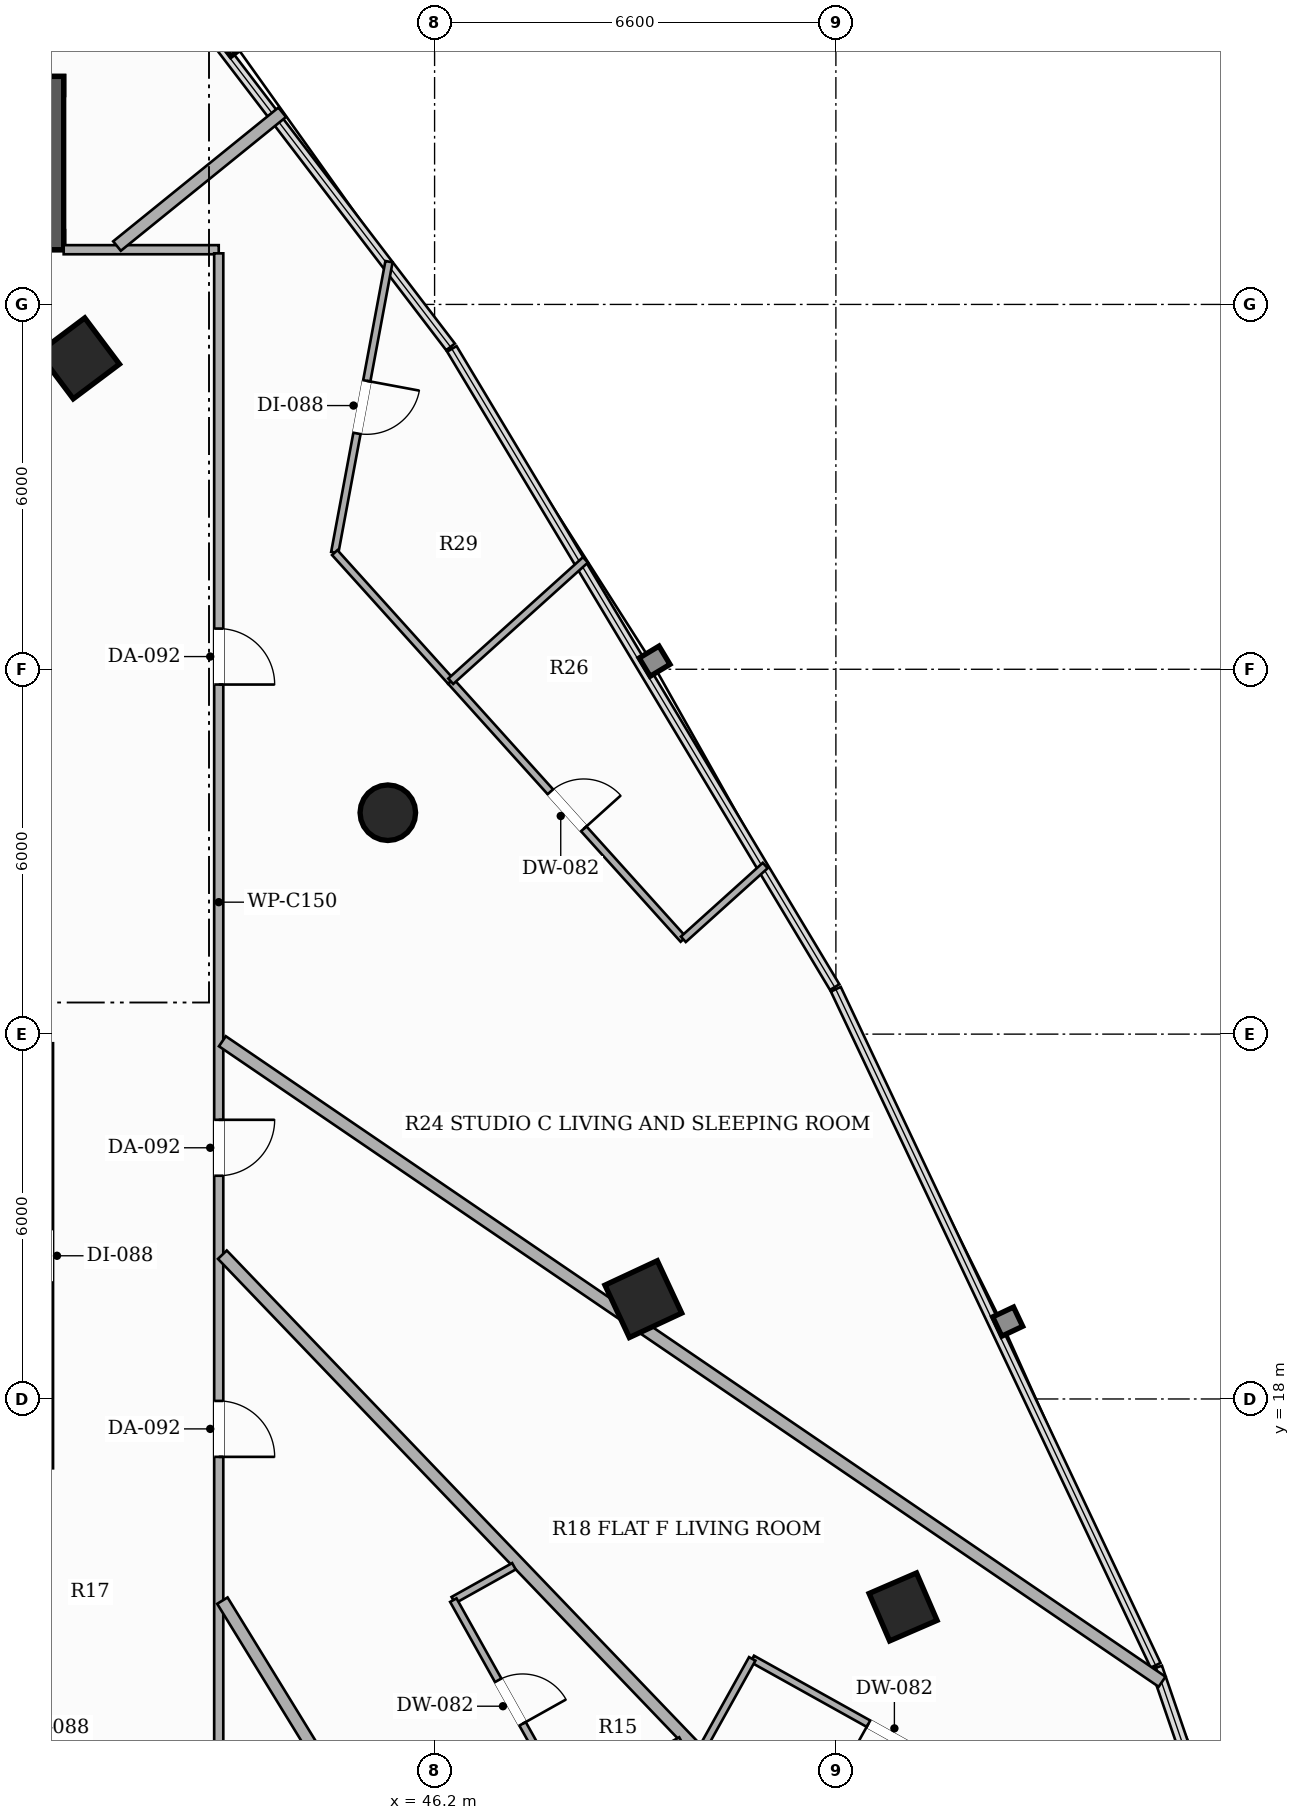
"""IFC4 building model, lengths in metres.
Left out: names, types, materials, properties, quantities, classifications, styles, units other than length and angle.
Written with IfcOpenShell. Run it as: python <this file> out.ifc"""

import sys

from ifc_helpers import new_model, si_unit, direction, frame, frame_2d, origin, origin_2d, place, context, subcontext, project, spatial, rectangle, hollow_rectangle, hollow_circle, extrude, element, fill, save


model = new_model("IFC4")
c1 = context("Model", 3, precision=1e-05, world=origin(), true_north=direction((0.0, 1.0)))
c2 = subcontext(c1, "Body", "Model", "MODEL_VIEW")
j1 = project(units=[si_unit("LENGTHUNIT", "METRE"), si_unit("PLANEANGLEUNIT", "RADIAN")], contexts=[c1])
p1 = place(None, origin())
s1 = spatial("IfcSite", under=j1, at=p1, CompositionType="ELEMENT")
p2 = place(p1, origin())
s2 = spatial("IfcBuilding", under=s1, at=p2, CompositionType="ELEMENT")
p3 = place(p2, frame((0.0, 0.0, 77.45)))
s3 = spatial("IfcBuildingStorey", under=s2, at=p3, CompositionType="ELEMENT", Elevation=77.45)
p4 = place(p3, frame((40.1, 37.05, 0.0), z_axis=(0.0, 0.0, 1.0), x_axis=(-1.0, 0.0, 0.0)))
e1 = element("IfcWall", 1, at=p4, inside=s3, PredefinedType="SHEAR", context=c2, shape_type="SweptSolid", body=[
    extrude(rectangle(XDim=14.2, YDim=0.3, at=frame_2d((7.1, 0.0))), origin(), (0.0, 0.0, 1.0), 3.3),
])
p5 = place(p4, frame((12.325, 0.0, 0.0)))
e2 = element("IfcOpeningElement", 2, at=p5, cuts=e1, PredefinedType="OPENING", context=c2, shape_type="SweptSolid", body=[
    extrude(rectangle(XDim=1.1, YDim=2.2, at=frame_2d((0.55, 1.1))), frame((0.0, 0.16, 0.0), z_axis=(0.0, -1.0, 0.0), x_axis=(1.0, 0.0, 0.0)), (0.0, 0.0, 1.0), 0.32),
])
p6 = place(p4, frame((0.775, 0.0, 0.0)))
e3 = element("IfcOpeningElement", 3, at=p6, cuts=e1, PredefinedType="OPENING", context=c2, shape_type="SweptSolid", body=[
    extrude(rectangle(XDim=1.1, YDim=2.2, at=frame_2d((0.55, 1.1))), frame((0.0, 0.16, 0.0), z_axis=(0.0, -1.0, 0.0), x_axis=(1.0, 0.0, 0.0)), (0.0, 0.0, 1.0), 0.32),
])
p7 = place(p3, frame((25.9, 39.6, 0.0), z_axis=(0.0, 0.0, 1.0), x_axis=(1.0, 0.0, 0.0)))
e4 = element("IfcWall", 4, at=p7, inside=s3, PredefinedType="SHEAR", context=c2, shape_type="SweptSolid", body=[
    extrude(rectangle(XDim=14.2, YDim=0.3, at=frame_2d((7.1, 0.0))), origin(), (0.0, 0.0, 1.0), 3.3),
])
p8 = place(p3, frame((39.95, 36.9, 0.0), z_axis=(0.0, 0.0, 1.0), x_axis=(0.0, 1.0, 0.0)))
e5 = element("IfcWall", 5, at=p8, inside=s3, PredefinedType="SHEAR", context=c2, shape_type="SweptSolid", body=[
    extrude(rectangle(XDim=2.85, YDim=0.3, at=frame_2d((1.425, 0.0))), origin(), (0.0, 0.0, 1.0), 3.3),
])
p9 = place(p3, frame((49.633, 19.642, 0.0), z_axis=(0.0, 0.0, 1.0), x_axis=(-0.422618261741, 0.906307787037, 0.0)))
e6 = element("IfcColumn", 6, at=p9, inside=s3, PredefinedType="COLUMN", context=c2, shape_type="SweptSolid", body=[
    extrude(hollow_rectangle(XDim=0.95, YDim=0.95, WallThickness=0.032, at=origin_2d()), origin(), (0.0, 0.0, 1.0), 3.3),
])
p10 = place(p3, frame((45.431, 27.641, 0.0), z_axis=(0.0, 0.0, 1.0), x_axis=(1.0, 0.0, 0.0)))
e7 = element("IfcColumn", 7, at=p10, inside=s3, PredefinedType="COLUMN", context=c2, shape_type="SweptSolid", body=[
    extrude(hollow_circle(Radius=0.457, WallThickness=0.025, at=origin_2d()), origin(), (0.0, 0.0, 1.0), 3.3),
])
p11 = place(p3, frame((40.352, 35.113, 0.0), z_axis=(0.0, 0.0, 1.0), x_axis=(-0.600420225326, 0.799684658487, 0.0)))
e8 = element("IfcColumn", 8, at=p11, inside=s3, PredefinedType="COLUMN", context=c2, shape_type="SweptSolid", body=[
    extrude(hollow_rectangle(XDim=0.95, YDim=0.95, WallThickness=0.032, at=origin_2d()), origin(), (0.0, 0.0, 1.0), 3.3),
])
p12 = place(p3, frame((53.905, 14.58, 0.0), z_axis=(0.0, 0.0, 1.0), x_axis=(-0.397147890635, 0.917754625684, 0.0)))
e9 = element("IfcColumn", 9, at=p12, inside=s3, PredefinedType="COLUMN", context=c2, shape_type="SweptSolid", body=[
    extrude(hollow_rectangle(XDim=0.85, YDim=0.85, WallThickness=0.028, at=origin_2d()), origin(), (0.0, 0.0, 1.0), 3.3),
])
p13 = place(p3, frame((40.1, 36.9, 0.0), z_axis=(0.0, 0.0, 1.0), x_axis=(1.0, 0.0, 0.0)))
e10 = element("IfcWall", 10, at=p13, inside=s3, PredefinedType="PARTITIONING", context=c2, shape_type="SweptSolid", body=[
    extrude(rectangle(XDim=2.55, YDim=0.15, at=frame_2d((1.275, 0.0))), origin(), (0.0, 0.0, 1.0), 2.413),
])
p14 = place(p3, frame((42.65, 36.84, 0.0), z_axis=(0.0, 0.0, 1.0), x_axis=(0.0, -1.0, 0.0)))
e11 = element("IfcWall", 11, at=p14, inside=s3, PredefinedType="PARTITIONING", context=c2, shape_type="SweptSolid", body=[
    extrude(rectangle(XDim=25.04, YDim=0.15, at=frame_2d((12.52, 0.0))), origin(), (0.0, 0.0, 1.0), 2.413),
])
p15 = place(p14, frame((6.171, 0.0, 0.0)))
e12 = element("IfcOpeningElement", 12, at=p15, cuts=e11, PredefinedType="OPENING", context=c2, shape_type="SweptSolid", body=[
    extrude(rectangle(XDim=0.92, YDim=2.15, at=frame_2d((0.46, 1.075))), frame((0.0, 0.085, 0.0), z_axis=(0.0, -1.0, 0.0), x_axis=(1.0, 0.0, 0.0)), (0.0, 0.0, 1.0), 0.17),
])
p16 = place(p14, frame((14.249, 0.0, 0.0)))
e13 = element("IfcOpeningElement", 13, at=p16, cuts=e11, PredefinedType="OPENING", context=c2, shape_type="SweptSolid", body=[
    extrude(rectangle(XDim=0.92, YDim=2.15, at=frame_2d((0.46, 1.075))), frame((0.0, 0.085, 0.0), z_axis=(0.0, -1.0, 0.0), x_axis=(1.0, 0.0, 0.0)), (0.0, 0.0, 1.0), 0.17),
])
p17 = place(p14, frame((18.872, 0.0, 0.0)))
e14 = element("IfcOpeningElement", 14, at=p17, cuts=e11, PredefinedType="OPENING", context=c2, shape_type="SweptSolid", body=[
    extrude(rectangle(XDim=0.92, YDim=2.15, at=frame_2d((0.46, 1.075))), frame((0.0, 0.085, 0.0), z_axis=(0.0, -1.0, 0.0), x_axis=(1.0, 0.0, 0.0)), (0.0, 0.0, 1.0), 0.17),
])
p18 = place(p3, frame((39.85, 16.86, 0.0), z_axis=(0.0, 0.0, 1.0), x_axis=(0.0, 1.0, 0.0)))
e15 = element("IfcWall", 15, at=p18, inside=s3, PredefinedType="PARTITIONING", context=c2, shape_type="SweptSolid", body=[
    extrude(rectangle(XDim=6.99, YDim=0.15, at=frame_2d((3.495, 0.0))), origin(), (0.0, 0.0, 1.0), 2.669),
])
p19 = place(p18, frame((3.055, 0.0, 0.0)))
e16 = element("IfcOpeningElement", 16, at=p19, cuts=e15, PredefinedType="OPENING", context=c2, shape_type="SweptSolid", body=[
    extrude(rectangle(XDim=0.88, YDim=2.1, at=frame_2d((0.44, 1.05))), frame((0.0, 0.085, 0.0), z_axis=(0.0, -1.0, 0.0), x_axis=(1.0, 0.0, 0.0)), (0.0, 0.0, 1.0), 0.17),
])
p20 = place(p3, frame((43.694, 39.16, 0.0), z_axis=(0.0, 0.0, 1.0), x_axis=(-0.777183068613, -0.629274564765, 0.0)))
e17 = element("IfcWall", 17, at=p20, inside=s3, PredefinedType="PARTITIONING", context=c2, shape_type="SweptSolid", body=[
    extrude(rectangle(XDim=3.496, YDim=0.2, at=frame_2d((1.748, 0.0))), origin(), (0.0, 0.0, 1.0), 3.06),
])
p21 = place(p3, frame((58.165, 13.35, 0.0), z_axis=(0.0, 0.0, 1.0), x_axis=(-0.826341659386, 0.563169123766, 0.0)))
e18 = element("IfcWall", 18, at=p21, inside=s3, PredefinedType="PARTITIONING", context=c2, shape_type="SweptSolid", body=[
    extrude(rectangle(XDim=18.703, YDim=0.2, at=frame_2d((9.352, 0.0))), origin(), (0.0, 0.0, 1.0), 2.413),
])
p22 = place(p3, frame((58.237, 4.179, 0.0), z_axis=(0.0, 0.0, 1.0), x_axis=(-0.69208567792, 0.721815360337, 0.0)))
e19 = element("IfcWall", 19, at=p22, inside=s3, PredefinedType="PARTITIONING", context=c2, shape_type="SweptSolid", body=[
    extrude(rectangle(XDim=22.435, YDim=0.2, at=frame_2d((11.218, 0.0))), origin(), (0.0, 0.0, 1.0), 2.413),
])
p23 = place(p3, frame((49.827, 3.09, 0.0), z_axis=(0.0, 0.0, 1.0), x_axis=(-0.523146880199, 0.852242536921, 0.0)))
e20 = element("IfcWall", 20, at=p23, inside=s3, PredefinedType="PARTITIONING", context=c2, shape_type="SweptSolid", body=[
    extrude(rectangle(XDim=13.604, YDim=0.2, at=frame_2d((6.802, 0.0))), origin(), (0.0, 0.0, 1.0), 2.413),
])
p24 = place(p3, frame((46.466, 29.803, 0.0), z_axis=(0.0, 0.0, 1.0), x_axis=(0.669491047861, -0.742820124144, 0.0)))
e21 = element("IfcWall", 21, at=p24, inside=s3, PredefinedType="PARTITIONING", context=c2, shape_type="SweptSolid", body=[
    extrude(rectangle(XDim=5.713, YDim=0.12, at=frame_2d((2.856, 0.0))), origin(), (0.0, 0.0, 1.0), 3.06),
])
p25 = place(p24, frame((2.447, 0.0, 0.0)))
e22 = element("IfcOpeningElement", 22, at=p25, cuts=e21, PredefinedType="OPENING", context=c2, shape_type="SweptSolid", body=[
    extrude(rectangle(XDim=0.82, YDim=2.1, at=frame_2d((0.41, 1.05))), frame((0.0, 0.07, 0.0), z_axis=(0.0, -1.0, 0.0), x_axis=(1.0, 0.0, 0.0)), (0.0, 0.0, 1.0), 0.14),
])
p26 = place(p3, frame((50.291, 25.559, 0.0), z_axis=(0.0, 0.0, 1.0), x_axis=(0.742845405041, 0.669462996894, 0.0)))
e23 = element("IfcWall", 23, at=p26, inside=s3, PredefinedType="PARTITIONING", context=c2, shape_type="SweptSolid", body=[
    extrude(rectangle(XDim=1.813, YDim=0.12, at=frame_2d((0.907, 0.0))), origin(), (0.0, 0.0, 1.0), 3.06),
])
p27 = place(p3, frame((45.45, 36.703, 0.0), z_axis=(0.0, 0.0, 1.0), x_axis=(-0.183267636936, -0.9830630566, 0.0)))
e24 = element("IfcWall", 24, at=p27, inside=s3, PredefinedType="PARTITIONING", context=c2, shape_type="SweptSolid", body=[
    extrude(rectangle(XDim=4.866, YDim=0.12, at=frame_2d((2.433, 0.0))), origin(), (0.0, 0.0, 1.0), 3.06),
])
p28 = place(p27, frame((1.993, 0.0, 0.0)))
e25 = element("IfcOpeningElement", 25, at=p28, cuts=e24, PredefinedType="OPENING", context=c2, shape_type="SweptSolid", body=[
    extrude(rectangle(XDim=0.88, YDim=2.1, at=frame_2d((0.44, 1.05))), frame((0.0, 0.07, 0.0), z_axis=(0.0, -1.0, 0.0), x_axis=(1.0, 0.0, 0.0)), (0.0, 0.0, 1.0), 0.14),
])
p29 = place(p3, frame((44.558, 31.919, 0.0), z_axis=(0.0, 0.0, 1.0), x_axis=(0.669660366513, -0.742667485165, 0.0)))
e26 = element("IfcWall", 26, at=p29, inside=s3, PredefinedType="PARTITIONING", context=c2, shape_type="SweptSolid", body=[
    extrude(rectangle(XDim=2.849, YDim=0.12, at=frame_2d((1.425, 0.0))), origin(), (0.0, 0.0, 1.0), 3.06),
])
p30 = place(p3, frame((46.466, 29.803, 0.0), z_axis=(0.0, 0.0, 1.0), x_axis=(0.742837964983, 0.669471252392, 0.0)))
e27 = element("IfcWall", 27, at=p30, inside=s3, PredefinedType="PARTITIONING", context=c2, shape_type="SweptSolid", body=[
    extrude(rectangle(XDim=2.982, YDim=0.12, at=frame_2d((1.491, 0.0))), origin(), (0.0, 0.0, 1.0), 3.06),
])
p31 = place(p3, frame((54.847, 11.818, 0.0), z_axis=(0.0, 0.0, 1.0), x_axis=(-0.87346578699, 0.486885529624, 0.0)))
e28 = element("IfcWall", 28, at=p31, inside=s3, PredefinedType="PARTITIONING", context=c2, shape_type="SweptSolid", body=[
    extrude(rectangle(XDim=3.919, YDim=0.12, at=frame_2d((1.959, 0.0))), origin(), (0.0, 0.0, 1.0), 2.413),
])
p32 = place(p31, frame((0.91, 0.0, 0.0)))
e29 = element("IfcOpeningElement", 29, at=p32, cuts=e28, PredefinedType="OPENING", context=c2, shape_type="SweptSolid", body=[
    extrude(rectangle(XDim=0.82, YDim=2.1, at=frame_2d((0.41, 1.05))), frame((0.0, 0.07, 0.0), z_axis=(0.0, -1.0, 0.0), x_axis=(1.0, 0.0, 0.0)), (0.0, 0.0, 1.0), 0.14),
])
p33 = place(p3, frame((51.424, 13.726, 0.0), z_axis=(0.0, 0.0, 1.0), x_axis=(-0.486605473044, -0.873621836726, 0.0)))
e30 = element("IfcWall", 30, at=p33, inside=s3, PredefinedType="PARTITIONING", context=c2, shape_type="SweptSolid", body=[
    extrude(rectangle(XDim=1.679, YDim=0.12, at=frame_2d((0.84, 0.0))), origin(), (0.0, 0.0, 1.0), 2.413),
])
p34 = place(p3, frame((47.505, 15.249, 0.0), z_axis=(0.0, 0.0, 1.0), x_axis=(-0.872914025969, -0.487874064967, 0.0)))
e31 = element("IfcWall", 31, at=p34, inside=s3, PredefinedType="PARTITIONING", context=c2, shape_type="SweptSolid", body=[
    extrude(rectangle(XDim=1.142, YDim=0.12, at=frame_2d((0.571, 0.0))), origin(), (0.0, 0.0, 1.0), 3.06),
])
p35 = place(p3, frame((46.508, 14.692, 0.0), z_axis=(0.0, 0.0, 1.0), x_axis=(0.488483407483, -0.872573183529, 0.0)))
e32 = element("IfcWall", 32, at=p35, inside=s3, PredefinedType="PARTITIONING", context=c2, shape_type="SweptSolid", body=[
    extrude(rectangle(XDim=3.843, YDim=0.12, at=frame_2d((1.921, 0.0))), origin(), (0.0, 0.0, 1.0), 3.06),
])
p36 = place(p35, frame((1.511, 0.0, 0.0)))
e33 = element("IfcOpeningElement", 33, at=p36, cuts=e32, PredefinedType="OPENING", context=c2, shape_type="SweptSolid", body=[
    extrude(rectangle(XDim=0.82, YDim=2.1, at=frame_2d((0.41, 1.05))), frame((0.0, 0.07, 0.0), z_axis=(0.0, -1.0, 0.0), x_axis=(1.0, 0.0, 0.0)), (0.0, 0.0, 1.0), 0.14),
])
p37 = place(p3, frame((48.385, 11.339, 0.0), z_axis=(0.0, 0.0, 1.0), x_axis=(0.872618854318, 0.488401817246, 0.0)))
e34 = element("IfcWall", 34, at=p37, inside=s3, PredefinedType="PARTITIONING", context=c2, shape_type="SweptSolid", body=[
    extrude(rectangle(XDim=2.139, YDim=0.12, at=frame_2d((1.07, 0.0))), origin(), (0.0, 0.0, 1.0), 2.413),
])
p38 = place(p15, origin())
e35 = element("IfcDoor", 35, at=p38, inside=s3, OperationType="SINGLE_SWING_RIGHT", PredefinedType="DOOR", context=c2, shape_type="SweptSolid", body=[
    extrude(rectangle(XDim=0.92, YDim=2.15, at=frame_2d((0.46, 1.075))), frame((0.0, 0.025, 0.0), z_axis=(0.0, -1.0, 0.0), x_axis=(1.0, 0.0, 0.0)), (0.0, 0.0, 1.0), 0.05),
])
fill(e12, e35)
p39 = place(p25, origin())
e36 = element("IfcDoor", 36, at=p39, inside=s3, OperationType="SINGLE_SWING_RIGHT", PredefinedType="DOOR", context=c2, shape_type="SweptSolid", body=[
    extrude(rectangle(XDim=0.82, YDim=2.1, at=frame_2d((0.41, 1.05))), frame((0.0, 0.025, 0.0), z_axis=(0.0, -1.0, 0.0), x_axis=(1.0, 0.0, 0.0)), (0.0, 0.0, 1.0), 0.05),
])
fill(e22, e36)
p40 = place(p28, origin())
e37 = element("IfcDoor", 37, at=p40, inside=s3, OperationType="SINGLE_SWING_LEFT", PredefinedType="DOOR", context=c2, shape_type="SweptSolid", body=[
    extrude(rectangle(XDim=0.88, YDim=2.1, at=frame_2d((0.44, 1.05))), frame((0.0, 0.025, 0.0), z_axis=(0.0, -1.0, 0.0), x_axis=(1.0, 0.0, 0.0)), (0.0, 0.0, 1.0), 0.05),
])
fill(e25, e37)
p41 = place(p16, origin())
e38 = element("IfcDoor", 38, at=p41, inside=s3, OperationType="SINGLE_SWING_LEFT", PredefinedType="DOOR", context=c2, shape_type="SweptSolid", body=[
    extrude(rectangle(XDim=0.92, YDim=2.15, at=frame_2d((0.46, 1.075))), frame((0.0, 0.025, 0.0), z_axis=(0.0, -1.0, 0.0), x_axis=(1.0, 0.0, 0.0)), (0.0, 0.0, 1.0), 0.05),
])
fill(e13, e38)
p42 = place(p32, origin())
e39 = element("IfcDoor", 39, at=p42, inside=s3, OperationType="SINGLE_SWING_RIGHT", PredefinedType="DOOR", context=c2, shape_type="SweptSolid", body=[
    extrude(rectangle(XDim=0.82, YDim=2.1, at=frame_2d((0.41, 1.05))), frame((0.0, 0.025, 0.0), z_axis=(0.0, -1.0, 0.0), x_axis=(1.0, 0.0, 0.0)), (0.0, 0.0, 1.0), 0.05),
])
fill(e29, e39)
p43 = place(p17, origin())
e40 = element("IfcDoor", 40, at=p43, inside=s3, OperationType="SINGLE_SWING_RIGHT", PredefinedType="DOOR", context=c2, shape_type="SweptSolid", body=[
    extrude(rectangle(XDim=0.92, YDim=2.15, at=frame_2d((0.46, 1.075))), frame((0.0, 0.025, 0.0), z_axis=(0.0, -1.0, 0.0), x_axis=(1.0, 0.0, 0.0)), (0.0, 0.0, 1.0), 0.05),
])
fill(e14, e40)
p44 = place(p36, origin())
e41 = element("IfcDoor", 41, at=p44, inside=s3, OperationType="SINGLE_SWING_RIGHT", PredefinedType="DOOR", context=c2, shape_type="SweptSolid", body=[
    extrude(rectangle(XDim=0.82, YDim=2.1, at=frame_2d((0.41, 1.05))), frame((0.0, 0.025, 0.0), z_axis=(0.0, -1.0, 0.0), x_axis=(1.0, 0.0, 0.0)), (0.0, 0.0, 1.0), 0.05),
])
fill(e33, e41)
save(model, sys.argv[1])
